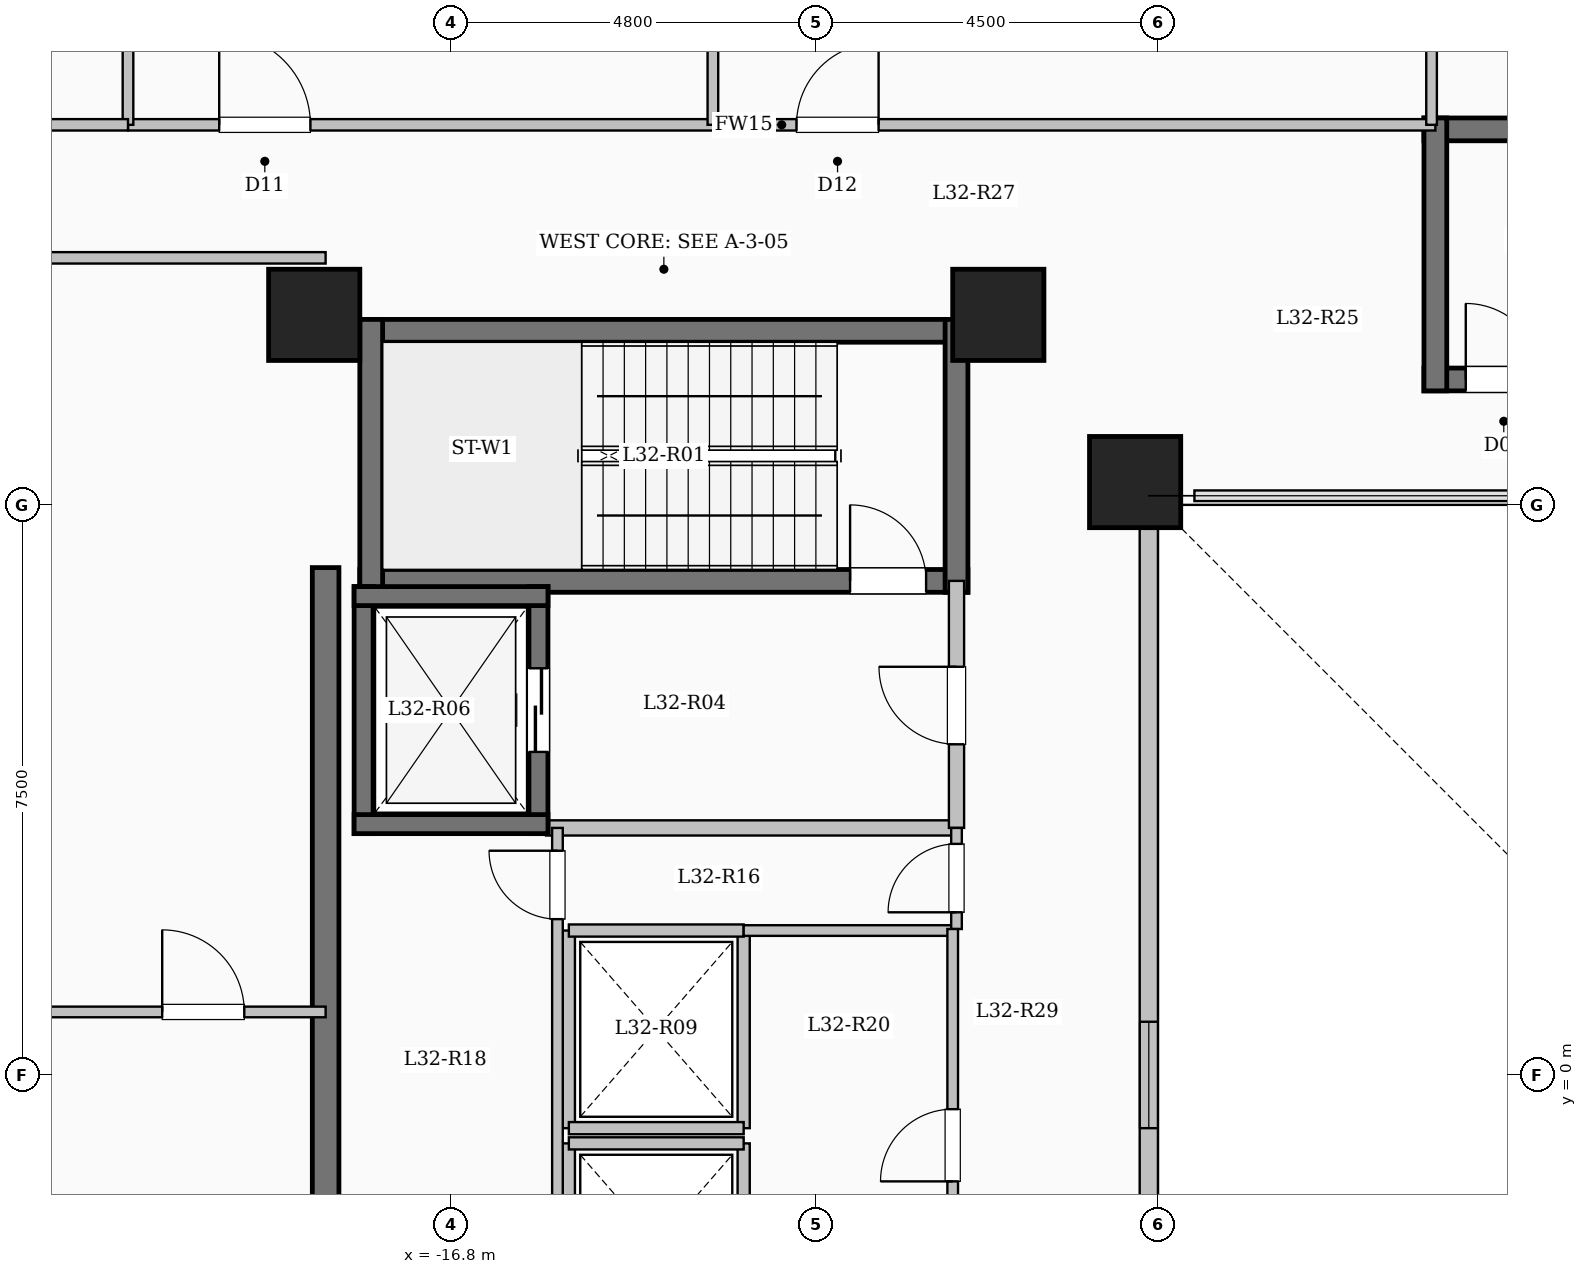
"""IFC4 building model, lengths in metres.
Left out: names, types, materials, properties, quantities, classifications, styles, units other than length and angle.
Written with IfcOpenShell. Run it as: python <this file> out.ifc"""

import sys

from ifc_helpers import new_model, si_unit, direction, frame, frame_2d, origin, origin_2d, place, context, subcontext, project, spatial, rectangle, extrude, element, fill, save


model = new_model("IFC4")
c1 = context("Model", 3, precision=1e-05, world=origin(), true_north=direction((0.0, 1.0)))
c2 = subcontext(c1, "Body", "Model", "MODEL_VIEW")
j1 = project(units=[si_unit("LENGTHUNIT", "METRE"), si_unit("PLANEANGLEUNIT", "RADIAN")], contexts=[c1])
p1 = place(None, origin())
s1 = spatial("IfcSite", under=j1, at=p1, CompositionType="ELEMENT")
p2 = place(p1, origin())
s2 = spatial("IfcBuilding", under=s1, at=p2, CompositionType="ELEMENT")
p3 = place(p2, frame((0.0, 0.0, 118.5)))
s3 = spatial("IfcBuildingStorey", under=s2, at=p3, CompositionType="ELEMENT", Elevation=118.5)
for number, where, z_axis, x_axis in (
    (1, (-7.8, 7.8, 0.0), (0.0, 0.0, 1.0), (1.0, 0.0, 0.0)),
    (2, (-9.6, 10.0, 0.0), (0.0, 0.0, 1.0), (1.0, 0.0, 0.0)),
    (3, (-18.6, 10.0, 0.0), (0.0, 0.0, 1.0), (1.0, 0.0, 0.0)),
):
    element("IfcColumn", number, at=place(p3, frame(where, z_axis=z_axis, x_axis=x_axis)), inside=s3, PredefinedType="COLUMN", context=c2, shape_type="SweptSolid", body=[
        extrude(rectangle(XDim=1.2, YDim=1.2, at=origin_2d()), origin(), (0.0, 0.0, 1.0), 4.5),
    ])
p4 = place(p3, frame((-7.62, 7.62, 0.0), z_axis=(0.0, 0.0, 1.0), x_axis=(0.0, -1.0, 0.0)))
e4 = element("IfcWall", 4, at=p4, inside=s3, PredefinedType="SOLIDWALL", context=c2, shape_type="SweptSolid", body=[
    extrude(rectangle(XDim=15.24, YDim=0.24, at=frame_2d((7.62, 0.0))), origin(), (0.0, 0.0, 1.0), 4.2),
])
p5 = place(p4, frame((6.92, 0.0, 0.95)))
e5 = element("IfcOpeningElement", 5, at=p5, cuts=e4, PredefinedType="OPENING", context=c2, shape_type="SweptSolid", body=[
    extrude(rectangle(XDim=1.4, YDim=1.5, at=frame_2d((0.7, 0.75))), frame((0.0, 0.13, 0.0), z_axis=(0.0, -1.0, 0.0), x_axis=(1.0, 0.0, 0.0)), (0.0, 0.0, 1.0), 0.26),
])
p6 = place(p3, frame((-18.0, 9.79, 0.0), z_axis=(0.0, 0.0, 1.0), x_axis=(1.0, 0.0, 0.0)))
e6 = element("IfcWall", 6, at=p6, inside=s3, PredefinedType="SHEAR", context=c2, shape_type="SweptSolid", body=[
    extrude(rectangle(XDim=8.0, YDim=0.3, at=frame_2d((4.0, 0.0))), origin(), (0.0, 0.0, 1.0), 4.5),
])
p7 = place(p3, frame((-18.0, 6.5, 0.0), z_axis=(0.0, 0.0, 1.0), x_axis=(1.0, 0.0, 0.0)))
e7 = element("IfcWall", 7, at=p7, inside=s3, PredefinedType="SHEAR", context=c2, shape_type="SweptSolid", body=[
    extrude(rectangle(XDim=8.0, YDim=0.3, at=frame_2d((4.0, 0.0))), origin(), (0.0, 0.0, 1.0), 4.5),
])
p8 = place(p7, frame((6.45, 0.0, 0.0)))
e8 = element("IfcOpeningElement", 8, at=p8, cuts=e7, PredefinedType="OPENING", context=c2, shape_type="SweptSolid", body=[
    extrude(rectangle(XDim=1.0, YDim=2.15, at=frame_2d((0.5, 1.075))), frame((0.0, 0.16, 0.0), z_axis=(0.0, -1.0, 0.0), x_axis=(1.0, 0.0, 0.0)), (0.0, 0.0, 1.0), 0.32),
])
for number, where, z_axis, x_axis in (
    (9, (-17.85, 6.35, 0.0), (0.0, 0.0, 1.0), (0.0, 1.0, 0.0)),
    (10, (-10.15, 6.35, 0.0), (0.0, 0.0, 1.0), (0.0, 1.0, 0.0)),
):
    element("IfcWall", number, at=place(p3, frame(where, z_axis=z_axis, x_axis=x_axis)), inside=s3, PredefinedType="SHEAR", context=c2, shape_type="SweptSolid", body=[
        extrude(rectangle(XDim=3.59, YDim=0.3, at=frame_2d((1.795, 0.0))), origin(), (0.0, 0.0, 1.0), 4.5),
    ])
p9 = place(p3, frame((-4.0, 12.44, 0.0), z_axis=(0.0, 0.0, 1.0), x_axis=(1.0, 0.0, 0.0)))
e11 = element("IfcWall", 11, at=p9, inside=s3, PredefinedType="SHEAR", context=c2, shape_type="SweptSolid", body=[
    extrude(rectangle(XDim=8.0, YDim=0.3, at=frame_2d((4.0, 0.0))), origin(), (0.0, 0.0, 1.0), 4.5),
])
p10 = place(p3, frame((-4.0, 9.15, 0.0), z_axis=(0.0, 0.0, 1.0), x_axis=(1.0, 0.0, 0.0)))
e12 = element("IfcWall", 12, at=p10, inside=s3, PredefinedType="SHEAR", context=c2, shape_type="SweptSolid", body=[
    extrude(rectangle(XDim=8.0, YDim=0.3, at=frame_2d((4.0, 0.0))), origin(), (0.0, 0.0, 1.0), 4.5),
])
p11 = place(p10, frame((0.55, 0.0, 0.0)))
e13 = element("IfcOpeningElement", 13, at=p11, cuts=e12, PredefinedType="OPENING", context=c2, shape_type="SweptSolid", body=[
    extrude(rectangle(XDim=1.0, YDim=2.15, at=frame_2d((0.5, 1.075))), frame((0.0, 0.16, 0.0), z_axis=(0.0, -1.0, 0.0), x_axis=(1.0, 0.0, 0.0)), (0.0, 0.0, 1.0), 0.32),
])
p12 = place(p3, frame((-3.85, 9.0, 0.0), z_axis=(0.0, 0.0, 1.0), x_axis=(0.0, 1.0, 0.0)))
e14 = element("IfcWall", 14, at=p12, inside=s3, PredefinedType="SHEAR", context=c2, shape_type="SweptSolid", body=[
    extrude(rectangle(XDim=3.59, YDim=0.3, at=frame_2d((1.795, 0.0))), origin(), (0.0, 0.0, 1.0), 4.5),
])
p13 = place(p3, frame((-15.55, 3.25, 0.0), z_axis=(0.0, 0.0, 1.0), x_axis=(1.0, 0.0, 0.0)))
e15 = element("IfcWall", 15, at=p13, inside=s3, PredefinedType="SOLIDWALL", context=c2, shape_type="SweptSolid", body=[
    extrude(rectangle(XDim=5.4, YDim=0.2, at=frame_2d((2.7, 0.0))), origin(), (0.0, 0.0, 1.0), 4.2),
])
p14 = place(p3, frame((-10.15, 3.25, 0.0), z_axis=(0.0, 0.0, 1.0), x_axis=(0.0, 1.0, 0.0)))
e16 = element("IfcWall", 16, at=p14, inside=s3, PredefinedType="SOLIDWALL", context=c2, shape_type="SweptSolid", body=[
    extrude(rectangle(XDim=3.25, YDim=0.2, at=frame_2d((1.625, 0.0))), origin(), (0.0, 0.0, 1.0), 4.2),
])
p15 = place(p14, frame((1.1, 0.0, 0.0)))
e17 = element("IfcOpeningElement", 17, at=p15, cuts=e16, PredefinedType="OPENING", context=c2, shape_type="SweptSolid", body=[
    extrude(rectangle(XDim=1.02, YDim=2.15, at=frame_2d((0.51, 1.075))), frame((0.0, 0.11, 0.0), z_axis=(0.0, -1.0, 0.0), x_axis=(1.0, 0.0, 0.0)), (0.0, 0.0, 1.0), 0.22),
])
p16 = place(p3, frame((-17.95, 3.175, 0.0), z_axis=(0.0, 0.0, 1.0), x_axis=(0.0, 1.0, 0.0)))
e18 = element("IfcWall", 18, at=p16, inside=s3, PredefinedType="SHEAR", context=c2, shape_type="SweptSolid", body=[
    extrude(rectangle(XDim=3.25, YDim=0.25, at=frame_2d((1.625, 0.0))), origin(), (0.0, 0.0, 1.0), 4.5),
])
p17 = place(p3, frame((-15.65, 3.175, 0.0), z_axis=(0.0, 0.0, 1.0), x_axis=(0.0, 1.0, 0.0)))
e19 = element("IfcWall", 19, at=p17, inside=s3, PredefinedType="SHEAR", context=c2, shape_type="SweptSolid", body=[
    extrude(rectangle(XDim=3.25, YDim=0.25, at=frame_2d((1.625, 0.0))), origin(), (0.0, 0.0, 1.0), 4.5),
])
p18 = place(p17, frame((1.075, 0.0, 0.0)))
e20 = element("IfcOpeningElement", 20, at=p18, cuts=e19, PredefinedType="OPENING", context=c2, shape_type="SweptSolid", body=[
    extrude(rectangle(XDim=1.1, YDim=2.15, at=frame_2d((0.55, 1.075))), frame((0.0, 0.135, 0.0), z_axis=(0.0, -1.0, 0.0), x_axis=(1.0, 0.0, 0.0)), (0.0, 0.0, 1.0), 0.27),
])
for number, where, z_axis, x_axis in (
    (21, (-18.075, 3.3, 0.0), (0.0, 0.0, 1.0), (1.0, 0.0, 0.0)),
    (22, (-18.075, 6.3, 0.0), (0.0, 0.0, 1.0), (1.0, 0.0, 0.0)),
):
    element("IfcWall", number, at=place(p3, frame(where, z_axis=z_axis, x_axis=x_axis)), inside=s3, PredefinedType="SHEAR", context=c2, shape_type="SweptSolid", body=[
        extrude(rectangle(XDim=2.55, YDim=0.25, at=frame_2d((1.275, 0.0))), origin(), (0.0, 0.0, 1.0), 4.5),
    ])
for number, where, z_axis, x_axis in (
    (23, (-15.25, -3.5, 0.0), (0.0, 0.0, 1.0), (0.0, 1.0, 0.0)),
    (24, (-12.95, -3.5, 0.0), (0.0, 0.0, 1.0), (0.0, 1.0, 0.0)),
):
    element("IfcWall", number, at=place(p3, frame(where, z_axis=z_axis, x_axis=x_axis)), inside=s3, PredefinedType="SOLIDWALL", context=c2, shape_type="SweptSolid", body=[
        extrude(rectangle(XDim=2.6, YDim=0.16, at=frame_2d((1.3, 0.0))), origin(), (0.0, 0.0, 1.0), 4.2),
    ])
p19 = place(p3, frame((-15.25, -0.9, 0.0), z_axis=(0.0, 0.0, 1.0), x_axis=(1.0, 0.0, 0.0)))
e25 = element("IfcWall", 25, at=p19, inside=s3, PredefinedType="SOLIDWALL", context=c2, shape_type="SweptSolid", body=[
    extrude(rectangle(XDim=2.3, YDim=0.16, at=frame_2d((1.15, 0.0))), origin(), (0.0, 0.0, 1.0), 4.2),
])
for number, where, z_axis, x_axis in (
    (26, (-15.25, -0.7, 0.0), (0.0, 0.0, 1.0), (0.0, 1.0, 0.0)),
    (27, (-12.95, -0.7, 0.0), (0.0, 0.0, 1.0), (0.0, 1.0, 0.0)),
):
    element("IfcWall", number, at=place(p3, frame(where, z_axis=z_axis, x_axis=x_axis)), inside=s3, PredefinedType="SOLIDWALL", context=c2, shape_type="SweptSolid", body=[
        extrude(rectangle(XDim=2.6, YDim=0.16, at=frame_2d((1.3, 0.0))), origin(), (0.0, 0.0, 1.0), 4.2),
    ])
for number, where, z_axis, x_axis in (
    (28, (-15.25, -0.7, 0.0), (0.0, 0.0, 1.0), (1.0, 0.0, 0.0)),
    (29, (-15.25, 1.9, 0.0), (0.0, 0.0, 1.0), (1.0, 0.0, 0.0)),
):
    element("IfcWall", number, at=place(p3, frame(where, z_axis=z_axis, x_axis=x_axis)), inside=s3, PredefinedType="SOLIDWALL", context=c2, shape_type="SweptSolid", body=[
        extrude(rectangle(XDim=2.3, YDim=0.16, at=frame_2d((1.15, 0.0))), origin(), (0.0, 0.0, 1.0), 4.2),
    ])
p20 = place(p3, frame((-18.45, -7.375, 0.0), z_axis=(0.0, 0.0, 1.0), x_axis=(0.0, 1.0, 0.0)))
e30 = element("IfcWall", 30, at=p20, inside=s3, PredefinedType="SHEAR", context=c2, shape_type="SweptSolid", body=[
    extrude(rectangle(XDim=14.05, YDim=0.35, at=frame_2d((7.025, 0.0))), origin(), (0.0, 0.0, 1.0), 4.5),
])
p21 = place(p3, frame((-12.95, 1.9, 0.0), z_axis=(0.0, 0.0, 1.0), x_axis=(1.0, 0.0, 0.0)))
e31 = element("IfcWall", 31, at=p21, inside=s3, PredefinedType="PARTITIONING", context=c2, shape_type="SweptSolid", body=[
    extrude(rectangle(XDim=2.8, YDim=0.14, at=frame_2d((1.4, 0.0))), origin(), (0.0, 0.0, 1.0), 4.2),
])
p22 = place(p3, frame((-10.15, 1.92, 0.0), z_axis=(0.0, 0.0, 1.0), x_axis=(0.0, 1.0, 0.0)))
e32 = element("IfcWall", 32, at=p22, inside=s3, PredefinedType="PARTITIONING", context=c2, shape_type="SweptSolid", body=[
    extrude(rectangle(XDim=1.33, YDim=0.14, at=frame_2d((0.665, 0.0))), origin(), (0.0, 0.0, 1.0), 4.2),
])
p23 = place(p22, frame((0.22, 0.0, 0.0)))
e33 = element("IfcOpeningElement", 33, at=p23, cuts=e32, PredefinedType="OPENING", context=c2, shape_type="SweptSolid", body=[
    extrude(rectangle(XDim=0.9, YDim=2.08, at=frame_2d((0.45, 1.04))), frame((0.0, 0.08, 0.0), z_axis=(0.0, -1.0, 0.0), x_axis=(1.0, 0.0, 0.0)), (0.0, 0.0, 1.0), 0.16),
])
p24 = place(p3, frame((-15.4, -7.2, 0.0), z_axis=(0.0, 0.0, 1.0), x_axis=(0.0, 1.0, 0.0)))
e34 = element("IfcWall", 34, at=p24, inside=s3, PredefinedType="PARTITIONING", context=c2, shape_type="SweptSolid", body=[
    extrude(rectangle(XDim=10.45, YDim=0.14, at=frame_2d((5.225, 0.0))), origin(), (0.0, 0.0, 1.0), 4.2),
])
p25 = place(p24, frame((9.25, 0.0, 0.0)))
e35 = element("IfcOpeningElement", 35, at=p25, cuts=e34, PredefinedType="OPENING", context=c2, shape_type="SweptSolid", body=[
    extrude(rectangle(XDim=0.9, YDim=2.08, at=frame_2d((0.45, 1.04))), frame((0.0, 0.08, 0.0), z_axis=(0.0, -1.0, 0.0), x_axis=(1.0, 0.0, 0.0)), (0.0, 0.0, 1.0), 0.16),
])
p26 = place(p3, frame((-10.2, -7.2, 0.0), z_axis=(0.0, 0.0, 1.0), x_axis=(0.0, 1.0, 0.0)))
e36 = element("IfcWall", 36, at=p26, inside=s3, PredefinedType="PARTITIONING", context=c2, shape_type="SweptSolid", body=[
    extrude(rectangle(XDim=9.12, YDim=0.14, at=frame_2d((4.56, 0.0))), origin(), (0.0, 0.0, 1.0), 4.2),
])
p27 = place(p26, frame((1.9, 0.0, 0.0)))
e37 = element("IfcOpeningElement", 37, at=p27, cuts=e36, PredefinedType="OPENING", context=c2, shape_type="SweptSolid", body=[
    extrude(rectangle(XDim=0.95, YDim=2.12, at=frame_2d((0.475, 1.06))), frame((0.0, 0.08, 0.0), z_axis=(0.0, -1.0, 0.0), x_axis=(1.0, 0.0, 0.0)), (0.0, 0.0, 1.0), 0.16),
])
p28 = place(p26, frame((5.8, 0.0, 0.0)))
e38 = element("IfcOpeningElement", 38, at=p28, cuts=e36, PredefinedType="OPENING", context=c2, shape_type="SweptSolid", body=[
    extrude(rectangle(XDim=0.95, YDim=2.12, at=frame_2d((0.475, 1.06))), frame((0.0, 0.08, 0.0), z_axis=(0.0, -1.0, 0.0), x_axis=(1.0, 0.0, 0.0)), (0.0, 0.0, 1.0), 0.16),
])
p29 = place(p3, frame((-21.05, 12.5, 0.0), z_axis=(0.0, 0.0, 1.0), x_axis=(1.0, 0.0, 0.0)))
e39 = element("IfcWall", 39, at=p29, inside=s3, PredefinedType="PARTITIONING", context=c2, shape_type="SweptSolid", body=[
    extrude(rectangle(XDim=17.2, YDim=0.15, at=frame_2d((8.6, 0.0))), origin(), (0.0, 0.0, 1.0), 4.2),
])
p30 = place(p29, frame((1.2, 0.0, 0.0)))
e40 = element("IfcOpeningElement", 40, at=p30, cuts=e39, PredefinedType="OPENING", context=c2, shape_type="SweptSolid", body=[
    extrude(rectangle(XDim=1.2, YDim=2.15, at=frame_2d((0.6, 1.075))), frame((0.0, 0.085, 0.0), z_axis=(0.0, -1.0, 0.0), x_axis=(1.0, 0.0, 0.0)), (0.0, 0.0, 1.0), 0.17),
])
p31 = place(p29, frame((8.795, 0.0, 0.0)))
e41 = element("IfcOpeningElement", 41, at=p31, cuts=e39, PredefinedType="OPENING", context=c2, shape_type="SweptSolid", body=[
    extrude(rectangle(XDim=1.08, YDim=2.15, at=frame_2d((0.54, 1.075))), frame((0.0, 0.085, 0.0), z_axis=(0.0, -1.0, 0.0), x_axis=(1.0, 0.0, 0.0)), (0.0, 0.0, 1.0), 0.17),
])
p32 = place(p3, frame((-3.9, 12.5, 0.0), z_axis=(0.0, 0.0, 1.0), x_axis=(0.0, 1.0, 0.0)))
e42 = element("IfcWall", 42, at=p32, inside=s3, PredefinedType="PARTITIONING", context=c2, shape_type="SweptSolid", body=[
    extrude(rectangle(XDim=11.08, YDim=0.14, at=frame_2d((5.54, 0.0))), origin(), (0.0, 0.0, 1.0), 4.2),
])
p33 = place(p3, frame((-13.355, 12.5, 0.0), z_axis=(0.0, 0.0, 1.0), x_axis=(0.0, 1.0, 0.0)))
e43 = element("IfcWall", 43, at=p33, inside=s3, PredefinedType="PARTITIONING", context=c2, shape_type="SweptSolid", body=[
    extrude(rectangle(XDim=9.6, YDim=0.14, at=frame_2d((4.8, 0.0))), origin(), (0.0, 0.0, 1.0), 4.2),
])
p34 = place(p3, frame((-26.88, 10.75, 0.0), z_axis=(0.0, 0.0, 1.0), x_axis=(1.0, 0.0, 0.0)))
e44 = element("IfcWall", 44, at=p34, inside=s3, PredefinedType="PARTITIONING", context=c2, shape_type="SweptSolid", body=[
    extrude(rectangle(XDim=8.43, YDim=0.15, at=frame_2d((4.215, 0.0))), origin(), (0.0, 0.0, 1.0), 4.2),
])
p35 = place(p3, frame((-21.05, 12.5, 0.0), z_axis=(0.0, 0.0, 1.0), x_axis=(0.0, 1.0, 0.0)))
e45 = element("IfcWall", 45, at=p35, inside=s3, PredefinedType="PARTITIONING", context=c2, shape_type="SweptSolid", body=[
    extrude(rectangle(XDim=5.35, YDim=0.14, at=frame_2d((2.675, 0.0))), origin(), (0.0, 0.0, 1.0), 4.2),
])
p36 = place(p3, frame((-26.88, 12.5, 0.0), z_axis=(0.0, 0.0, 1.0), x_axis=(1.0, 0.0, 0.0)))
e46 = element("IfcWall", 46, at=p36, inside=s3, PredefinedType="PARTITIONING", context=c2, shape_type="SweptSolid", body=[
    extrude(rectangle(XDim=5.83, YDim=0.15, at=frame_2d((2.915, 0.0))), origin(), (0.0, 0.0, 1.0), 4.2),
])
p37 = place(p36, frame((2.44, 0.0, 0.0)))
e47 = element("IfcOpeningElement", 47, at=p37, cuts=e46, PredefinedType="OPENING", context=c2, shape_type="SweptSolid", body=[
    extrude(rectangle(XDim=0.95, YDim=2.15, at=frame_2d((0.475, 1.075))), frame((0.0, 0.085, 0.0), z_axis=(0.0, -1.0, 0.0), x_axis=(1.0, 0.0, 0.0)), (0.0, 0.0, 1.0), 0.17),
])
p38 = place(p3, frame((-26.88, 0.829, 0.0), z_axis=(0.0, 0.0, 1.0), x_axis=(1.0, 0.0, 0.0)))
e48 = element("IfcWall", 48, at=p38, inside=s3, PredefinedType="PARTITIONING", context=c2, shape_type="SweptSolid", body=[
    extrude(rectangle(XDim=8.43, YDim=0.14, at=frame_2d((4.215, 0.0))), origin(), (0.0, 0.0, 1.0), 4.2),
])
p39 = place(p38, frame((6.28, 0.0, 0.0)))
e49 = element("IfcOpeningElement", 49, at=p39, cuts=e48, PredefinedType="OPENING", context=c2, shape_type="SweptSolid", body=[
    extrude(rectangle(XDim=1.08, YDim=2.15, at=frame_2d((0.54, 1.075))), frame((0.0, 0.08, 0.0), z_axis=(0.0, -1.0, 0.0), x_axis=(1.0, 0.0, 0.0)), (0.0, 0.0, 1.0), 0.16),
])
p40 = place(p5, origin())
e50 = element("IfcWindow", 50, at=p40, inside=s3, PartitioningType="SINGLE_PANEL", PredefinedType="WINDOW", context=c2, shape_type="SweptSolid", body=[
    extrude(rectangle(XDim=1.4, YDim=1.5, at=frame_2d((0.7, 0.75))), frame((0.0, 0.03, 0.0), z_axis=(0.0, -1.0, 0.0), x_axis=(1.0, 0.0, 0.0)), (0.0, 0.0, 1.0), 0.06),
])
fill(e5, e50)
p41 = place(p8, origin())
e51 = element("IfcDoor", 51, at=p41, inside=s3, OperationType="SINGLE_SWING_LEFT", PredefinedType="DOOR", context=c2, shape_type="SweptSolid", body=[
    extrude(rectangle(XDim=1.0, YDim=2.15, at=frame_2d((0.5, 1.075))), frame((0.0, 0.025, 0.0), z_axis=(0.0, -1.0, 0.0), x_axis=(1.0, 0.0, 0.0)), (0.0, 0.0, 1.0), 0.05),
])
fill(e8, e51)
p42 = place(p11, origin())
e52 = element("IfcDoor", 52, at=p42, inside=s3, OperationType="SINGLE_SWING_LEFT", PredefinedType="DOOR", context=c2, shape_type="SweptSolid", body=[
    extrude(rectangle(XDim=1.0, YDim=2.15, at=frame_2d((0.5, 1.075))), frame((0.0, 0.025, 0.0), z_axis=(0.0, -1.0, 0.0), x_axis=(1.0, 0.0, 0.0)), (0.0, 0.0, 1.0), 0.05),
])
fill(e13, e52)
p43 = place(p15, origin())
e53 = element("IfcDoor", 53, at=p43, inside=s3, OperationType="SINGLE_SWING_RIGHT", PredefinedType="DOOR", context=c2, shape_type="SweptSolid", body=[
    extrude(rectangle(XDim=1.02, YDim=2.15, at=frame_2d((0.51, 1.075))), frame((0.0, 0.025, 0.0), z_axis=(0.0, -1.0, 0.0), x_axis=(1.0, 0.0, 0.0)), (0.0, 0.0, 1.0), 0.05),
])
fill(e17, e53)
p44 = place(p18, origin())
e54 = element("IfcDoor", 54, at=p44, inside=s3, OperationType="SLIDING_TO_LEFT", PredefinedType="DOOR", context=c2, shape_type="SweptSolid", body=[
    extrude(rectangle(XDim=1.1, YDim=2.15, at=frame_2d((0.55, 1.075))), frame((0.0, 0.025, 0.0), z_axis=(0.0, -1.0, 0.0), x_axis=(1.0, 0.0, 0.0)), (0.0, 0.0, 1.0), 0.05),
])
fill(e20, e54)
p45 = place(p23, origin())
e55 = element("IfcDoor", 55, at=p45, inside=s3, OperationType="SINGLE_SWING_LEFT", PredefinedType="DOOR", context=c2, shape_type="SweptSolid", body=[
    extrude(rectangle(XDim=0.9, YDim=2.08, at=frame_2d((0.45, 1.04))), frame((0.0, 0.025, 0.0), z_axis=(0.0, -1.0, 0.0), x_axis=(1.0, 0.0, 0.0)), (0.0, 0.0, 1.0), 0.05),
])
fill(e33, e55)
p46 = place(p25, origin())
e56 = element("IfcDoor", 56, at=p46, inside=s3, OperationType="SINGLE_SWING_RIGHT", PredefinedType="DOOR", context=c2, shape_type="SweptSolid", body=[
    extrude(rectangle(XDim=0.9, YDim=2.08, at=frame_2d((0.45, 1.04))), frame((0.0, 0.025, 0.0), z_axis=(0.0, -1.0, 0.0), x_axis=(1.0, 0.0, 0.0)), (0.0, 0.0, 1.0), 0.05),
])
fill(e35, e56)
p47 = place(p28, origin())
e57 = element("IfcDoor", 57, at=p47, inside=s3, OperationType="SINGLE_SWING_LEFT", PredefinedType="DOOR", context=c2, shape_type="SweptSolid", body=[
    extrude(rectangle(XDim=0.95, YDim=2.12, at=frame_2d((0.475, 1.06))), frame((0.0, 0.025, 0.0), z_axis=(0.0, -1.0, 0.0), x_axis=(1.0, 0.0, 0.0)), (0.0, 0.0, 1.0), 0.05),
])
fill(e38, e57)
p48 = place(p30, origin())
e58 = element("IfcDoor", 58, at=p48, inside=s3, OperationType="SINGLE_SWING_LEFT", PredefinedType="DOOR", context=c2, shape_type="SweptSolid", body=[
    extrude(rectangle(XDim=1.2, YDim=2.15, at=frame_2d((0.6, 1.075))), frame((0.0, 0.025, 0.0), z_axis=(0.0, -1.0, 0.0), x_axis=(1.0, 0.0, 0.0)), (0.0, 0.0, 1.0), 0.05),
])
fill(e40, e58)
p49 = place(p31, origin())
e59 = element("IfcDoor", 59, at=p49, inside=s3, OperationType="SINGLE_SWING_RIGHT", PredefinedType="DOOR", context=c2, shape_type="SweptSolid", body=[
    extrude(rectangle(XDim=1.08, YDim=2.15, at=frame_2d((0.54, 1.075))), frame((0.0, 0.025, 0.0), z_axis=(0.0, -1.0, 0.0), x_axis=(1.0, 0.0, 0.0)), (0.0, 0.0, 1.0), 0.05),
])
fill(e41, e59)
p50 = place(p39, origin())
e60 = element("IfcDoor", 60, at=p50, inside=s3, OperationType="SINGLE_SWING_LEFT", PredefinedType="DOOR", context=c2, shape_type="SweptSolid", body=[
    extrude(rectangle(XDim=1.08, YDim=2.15, at=frame_2d((0.54, 1.075))), frame((0.0, 0.025, 0.0), z_axis=(0.0, -1.0, 0.0), x_axis=(1.0, 0.0, 0.0)), (0.0, 0.0, 1.0), 0.05),
])
fill(e49, e60)
save(model, sys.argv[1])
